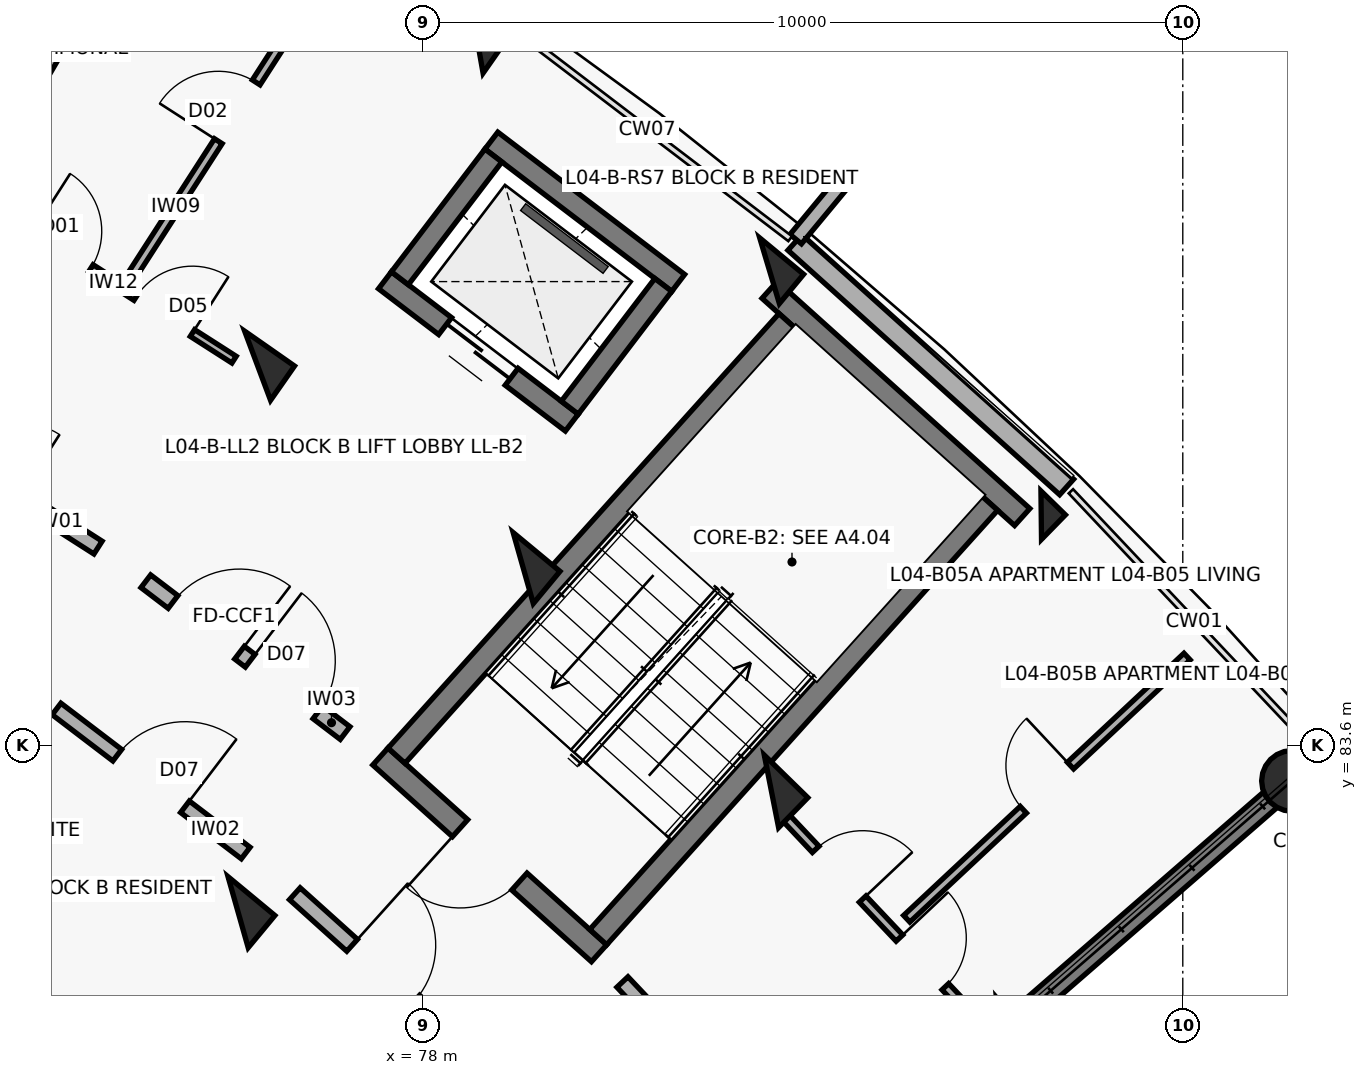
"""IFC4 building model, lengths in metres.
Left out: names, types, materials, properties, quantities, classifications, styles, units other than length and angle.
Written with IfcOpenShell. Run it as: python <this file> out.ifc"""

import sys

from ifc_helpers import new_model, si_unit, direction, frame, frame_2d, origin, origin_2d, place, context, subcontext, project, spatial, rectangle, circle, extrude, element, fill, save


model = new_model("IFC4")
c1 = context("Model", 3, precision=1e-05, world=origin(), true_north=direction((0.0, 1.0)))
c2 = subcontext(c1, "Body", "Model", "MODEL_VIEW")
j1 = project(units=[si_unit("LENGTHUNIT", "METRE"), si_unit("PLANEANGLEUNIT", "RADIAN")], contexts=[c1])
p1 = place(None, origin())
s1 = spatial("IfcSite", under=j1, at=p1, CompositionType="ELEMENT")
p2 = place(p1, origin())
s2 = spatial("IfcBuilding", under=s1, at=p2, CompositionType="ELEMENT")
p3 = place(p2, frame((0.0, 0.0, 14.3)))
s3 = spatial("IfcBuildingStorey", under=s2, at=p3, CompositionType="ELEMENT", Elevation=14.3)
p4 = place(p3, frame((75.828, 88.592, 0.0), z_axis=(0.0, 0.0, 1.0), x_axis=(0.573004420611, 0.819552276527, 0.0)))
e1 = element("IfcColumn", 1, at=p4, inside=s3, PredefinedType="COLUMN", context=c2, shape_type="SweptSolid", body=[
    extrude(rectangle(XDim=0.55, YDim=0.8, at=origin_2d()), origin(), (0.0, 0.0, 1.0), 3.1),
])
p5 = place(p3, frame((78.739, 92.755, 0.0), z_axis=(0.0, 0.0, 1.0), x_axis=(0.573004420611, 0.819552276527, 0.0)))
e2 = element("IfcColumn", 2, at=p5, inside=s3, PredefinedType="COLUMN", context=c2, shape_type="SweptSolid", body=[
    extrude(rectangle(XDim=0.45, YDim=0.45, at=origin_2d()), origin(), (0.0, 0.0, 1.0), 3.1),
])
for number, where, z_axis, x_axis in (
    (3, (75.571, 81.402, 0.0), (0.0, 0.0, 1.0), (0.638, 0.77, 0.0)),
    (4, (79.322, 85.93, 0.0), (0.0, 0.0, 1.0), (0.638, 0.77, 0.0)),
):
    element("IfcColumn", number, at=place(p3, frame(where, z_axis=z_axis, x_axis=x_axis)), inside=s3, PredefinedType="COLUMN", context=c2, shape_type="SweptSolid", body=[
        extrude(rectangle(XDim=0.55, YDim=0.8, at=origin_2d()), origin(), (0.0, 0.0, 1.0), 3.1),
    ])
p6 = place(p3, frame((82.563, 89.842, 0.0), z_axis=(0.0, 0.0, 1.0), x_axis=(0.637961754089, 0.770068049148, 0.0)))
e5 = element("IfcColumn", 5, at=p6, inside=s3, PredefinedType="COLUMN", context=c2, shape_type="SweptSolid", body=[
    extrude(rectangle(XDim=0.5, YDim=0.75, at=origin_2d()), origin(), (0.0, 0.0, 1.0), 3.1),
])
p7 = place(p3, frame((82.588, 82.991, 0.0), z_axis=(0.0, 0.0, 1.0), x_axis=(0.698665066769, 0.715448897181, 0.0)))
e6 = element("IfcColumn", 6, at=p7, inside=s3, PredefinedType="COLUMN", context=c2, shape_type="SweptSolid", body=[
    extrude(rectangle(XDim=0.55, YDim=0.8, at=origin_2d()), origin(), (0.0, 0.0, 1.0), 3.1),
])
p8 = place(p3, frame((86.137, 86.626, 0.0), z_axis=(0.0, 0.0, 1.0), x_axis=(0.698665066769, 0.715448897181, 0.0)))
e7 = element("IfcColumn", 7, at=p8, inside=s3, PredefinedType="COLUMN", context=c2, shape_type="SweptSolid", body=[
    extrude(rectangle(XDim=0.45, YDim=0.45, at=origin_2d()), origin(), (0.0, 0.0, 1.0), 3.1),
])
p9 = place(p3, frame((89.437, 83.129, 0.0), z_axis=(0.0, 0.0, 1.0), x_axis=(0.754709580223, 0.656059028991, 0.0)))
e8 = element("IfcColumn", 8, at=p9, inside=s3, PredefinedType="COLUMN", context=c2, shape_type="SweptSolid", body=[
    extrude(circle(Radius=0.4, at=origin_2d()), origin(), (0.0, 0.0, 1.0), 3.1),
])
p10 = place(p3, frame((85.739, 79.914, 0.0), z_axis=(0.0, 0.0, 1.0), x_axis=(0.754703505217, 0.65606601742, 0.0)))
e9 = element("IfcWall", 9, at=p10, inside=s3, PredefinedType="SHEAR", context=c2, shape_type="SweptSolid", body=[
    extrude(rectangle(XDim=4.72, YDim=0.27, at=frame_2d((2.36, 0.0))), origin(), (0.0, 0.0, 1.0), 2.86),
])
p11 = place(p3, frame((82.897, 90.213, 0.0), z_axis=(0.0, 0.0, 1.0), x_axis=(0.743387539862, -0.668860946369, 0.0)))
e10 = element("IfcWall", 10, at=p11, inside=s3, PredefinedType="SOLIDWALL", context=c2, shape_type="SweptSolid", body=[
    extrude(rectangle(XDim=4.809, YDim=0.275, at=frame_2d((2.405, 0.0))), origin(), (0.0, 0.0, 1.0), 2.25),
])
p12 = place(p3, frame((82.908, 90.257, 0.0), z_axis=(0.0, 0.0, 1.0), x_axis=(0.637967316825, 0.770063440674, 0.0)))
e11 = element("IfcWall", 11, at=p12, inside=s3, PredefinedType="PARAPET", context=c2, shape_type="SweptSolid", body=[
    extrude(rectangle(XDim=0.9, YDim=0.195, at=frame_2d((0.45, 0.0))), origin(), (0.0, 0.0, 1.0), 2.25),
])
p13 = place(p3, frame((80.32, 80.862, 0.0), z_axis=(0.0, 0.0, 1.0), x_axis=(-0.743375696158, 0.668874109501, 0.0)))
e12 = element("IfcWall", 12, at=p13, inside=s3, PredefinedType="SHEAR", context=c2, shape_type="SweptSolid", body=[
    extrude(rectangle(XDim=3.87, YDim=0.3, at=frame_2d((1.935, 0.0))), origin(), (0.0, 0.0, 1.0), 3.1),
])
p14 = place(p13, frame((1.41, 0.0, 0.0)))
e13 = element("IfcOpeningElement", 13, at=p14, cuts=e12, PredefinedType="OPENING", context=c2, shape_type="SweptSolid", body=[
    extrude(rectangle(XDim=1.05, YDim=2.15, at=frame_2d((0.525, 1.075))), frame((0.0, 0.16, 0.0), z_axis=(0.0, -1.0, 0.0), x_axis=(1.0, 0.0, 0.0)), (0.0, 0.0, 1.0), 0.32),
])
p15 = place(p3, frame((85.887, 86.601, 0.0), z_axis=(0.0, 0.0, 1.0), x_axis=(-0.743400052815, 0.668847038922, 0.0)))
e14 = element("IfcWall", 14, at=p15, inside=s3, PredefinedType="SHEAR", context=c2, shape_type="SweptSolid", body=[
    extrude(rectangle(XDim=4.47, YDim=0.3, at=frame_2d((2.235, 0.0))), origin(), (0.0, 0.0, 1.0), 3.1),
])
p16 = place(p3, frame((80.309, 81.073, 0.0), z_axis=(0.0, 0.0, 1.0), x_axis=(0.668885797871, 0.743365179038, 0.0)))
e15 = element("IfcWall", 15, at=p16, inside=s3, PredefinedType="SHEAR", context=c2, shape_type="SweptSolid", body=[
    extrude(rectangle(XDim=7.69, YDim=0.3, at=frame_2d((3.845, 0.0))), origin(), (0.0, 0.0, 1.0), 3.1),
])
p17 = place(p3, frame((77.655, 83.461, 0.0), z_axis=(0.0, 0.0, 1.0), x_axis=(0.668868253964, 0.743380964808, 0.0)))
e16 = element("IfcWall", 16, at=p17, inside=s3, PredefinedType="SHEAR", context=c2, shape_type="SweptSolid", body=[
    extrude(rectangle(XDim=7.69, YDim=0.3, at=frame_2d((3.845, 0.0))), origin(), (0.0, 0.0, 1.0), 3.1),
])
p18 = place(p3, frame((79.961, 87.844, 0.0), z_axis=(0.0, 0.0, 1.0), x_axis=(-0.795464365424, 0.606000365793, 0.0)))
e17 = element("IfcWall", 17, at=p18, inside=s3, PredefinedType="SHEAR", context=c2, shape_type="SweptSolid", body=[
    extrude(rectangle(XDim=3.09, YDim=0.28, at=frame_2d((1.545, 0.0))), origin(), (0.0, 0.0, 1.0), 3.1),
])
p19 = place(p18, frame((0.995, 0.0, 0.0)))
e18 = element("IfcOpeningElement", 18, at=p19, cuts=e17, PredefinedType="OPENING", context=c2, shape_type="SweptSolid", body=[
    extrude(rectangle(XDim=1.1, YDim=2.15, at=frame_2d((0.55, 1.075))), frame((0.0, 0.15, 0.0), z_axis=(0.0, -1.0, 0.0), x_axis=(1.0, 0.0, 0.0)), (0.0, 0.0, 1.0), 0.3),
])
p20 = place(p3, frame((81.361, 89.681, 0.0), z_axis=(0.0, 0.0, 1.0), x_axis=(-0.795502452183, 0.605950368076, 0.0)))
e19 = element("IfcWall", 19, at=p20, inside=s3, PredefinedType="SHEAR", context=c2, shape_type="SweptSolid", body=[
    extrude(rectangle(XDim=3.09, YDim=0.28, at=frame_2d((1.545, 0.0))), origin(), (0.0, 0.0, 1.0), 3.1),
])
for number, where, z_axis, x_axis in (
    (20, (79.935, 88.04, 0.0), (0.0, 0.0, 1.0), (0.606, 0.795, 0.0)),
    (21, (77.699, 89.743, 0.0), (0.0, 0.0, 1.0), (0.606, 0.795, 0.0)),
):
    element("IfcWall", number, at=place(p3, frame(where, z_axis=z_axis, x_axis=x_axis)), inside=s3, PredefinedType="SHEAR", context=c2, shape_type="SweptSolid", body=[
        extrude(rectangle(XDim=2.03, YDim=0.28, at=frame_2d((1.015, 0.0))), origin(), (0.0, 0.0, 1.0), 3.1),
    ])
p21 = place(p3, frame((70.834, 88.051, 0.0), z_axis=(0.0, 0.0, 1.0), x_axis=(0.842257205985, -0.539075874963, 0.0)))
e22 = element("IfcWall", 22, at=p21, inside=s3, PredefinedType="SOLIDWALL", context=c2, shape_type="SweptSolid", body=[
    extrude(rectangle(XDim=3.436, YDim=0.2, at=frame_2d((1.718, 0.0))), origin(), (0.0, 0.0, 1.0), 2.08),
])
p22 = place(p21, frame((1.228, 0.0, 0.0)))
e23 = element("IfcOpeningElement", 23, at=p22, cuts=e22, PredefinedType="OPENING", context=c2, shape_type="SweptSolid", body=[
    extrude(rectangle(XDim=0.98, YDim=2.15, at=frame_2d((0.49, 1.075))), frame((0.0, 0.11, 0.0), z_axis=(0.0, -1.0, 0.0), x_axis=(1.0, 0.0, 0.0)), (0.0, 0.0, 1.0), 0.22),
])
p23 = place(p3, frame((72.33, 90.712, 0.0), z_axis=(0.0, 0.0, 1.0), x_axis=(0.842245628842, -0.539093962771, 0.0)))
e24 = element("IfcWall", 24, at=p23, inside=s3, PredefinedType="PARTITIONING", context=c2, shape_type="SweptSolid", body=[
    extrude(rectangle(XDim=3.785, YDim=0.105, at=frame_2d((1.893, 0.0))), origin(), (0.0, 0.0, 1.0), 2.08),
])
p24 = place(p23, frame((0.65, 0.0, 0.0)))
e25 = element("IfcOpeningElement", 25, at=p24, cuts=e24, PredefinedType="OPENING", context=c2, shape_type="SweptSolid", body=[
    extrude(rectangle(XDim=0.9, YDim=2.1, at=frame_2d((0.45, 1.05))), frame((0.0, 0.062, 0.0), z_axis=(0.0, -1.0, 0.0), x_axis=(1.0, 0.0, 0.0)), (0.0, 0.0, 1.0), 0.125),
])
p25 = place(p23, frame((2.255, 0.0, 0.0)))
e26 = element("IfcOpeningElement", 26, at=p25, cuts=e24, PredefinedType="OPENING", context=c2, shape_type="SweptSolid", body=[
    extrude(rectangle(XDim=0.88, YDim=2.1, at=frame_2d((0.44, 1.05))), frame((0.0, 0.062, 0.0), z_axis=(0.0, -1.0, 0.0), x_axis=(1.0, 0.0, 0.0)), (0.0, 0.0, 1.0), 0.125),
])
p26 = place(p3, frame((74.192, 89.81, 0.0), z_axis=(0.0, 0.0, 1.0), x_axis=(0.541612517702, 0.840628265447, 0.0)))
e27 = element("IfcWall", 27, at=p26, inside=s3, PredefinedType="PARTITIONING", context=c2, shape_type="SweptSolid", body=[
    extrude(rectangle(XDim=5.05, YDim=0.12, at=frame_2d((2.525, 0.0))), origin(), (0.0, 0.0, 1.0), 2.08),
])
p27 = place(p26, frame((2.065, 0.0, 0.0)))
e28 = element("IfcOpeningElement", 28, at=p27, cuts=e27, PredefinedType="OPENING", context=c2, shape_type="SweptSolid", body=[
    extrude(rectangle(XDim=0.92, YDim=2.1, at=frame_2d((0.46, 1.05))), frame((0.0, 0.07, 0.0), z_axis=(0.0, -1.0, 0.0), x_axis=(1.0, 0.0, 0.0)), (0.0, 0.0, 1.0), 0.14),
])
p28 = place(p3, frame((72.379, 91.392, 0.0), z_axis=(0.0, 0.0, 1.0), x_axis=(0.504216452091, 0.863577309475, 0.0)))
e29 = element("IfcWall", 29, at=p28, inside=s3, PredefinedType="SOLIDWALL", context=c2, shape_type="SweptSolid", body=[
    extrude(rectangle(XDim=4.35, YDim=0.185, at=frame_2d((2.175, 0.0))), origin(), (0.0, 0.0, 1.0), 2.08),
])
p29 = place(p3, frame((74.357, 85.756, 0.0), z_axis=(0.0, 0.0, 1.0), x_axis=(0.795498026433, -0.605956178235, 0.0)))
e30 = element("IfcWall", 30, at=p29, inside=s3, PredefinedType="SOLIDWALL", context=c2, shape_type="SweptSolid", body=[
    extrude(rectangle(XDim=3.296, YDim=0.21, at=frame_2d((1.648, 0.0))), origin(), (0.0, 0.0, 1.0), 2.08),
])
p30 = place(p29, frame((0.45, 0.0, 0.0)))
e31 = element("IfcOpeningElement", 31, at=p30, cuts=e30, PredefinedType="OPENING", context=c2, shape_type="SweptSolid", body=[
    extrude(rectangle(XDim=1.1, YDim=2.15, at=frame_2d((0.55, 1.075))), frame((0.0, 0.115, 0.0), z_axis=(0.0, -1.0, 0.0), x_axis=(1.0, 0.0, 0.0)), (0.0, 0.0, 1.0), 0.23),
])
p31 = place(p29, frame((1.726, 0.0, 0.0)))
e32 = element("IfcOpeningElement", 32, at=p31, cuts=e30, PredefinedType="OPENING", context=c2, shape_type="SweptSolid", body=[
    extrude(rectangle(XDim=1.12, YDim=2.15, at=frame_2d((0.56, 1.075))), frame((0.0, 0.115, 0.0), z_axis=(0.0, -1.0, 0.0), x_axis=(1.0, 0.0, 0.0)), (0.0, 0.0, 1.0), 0.23),
])
p32 = place(p3, frame((73.182, 84.076, 0.0), z_axis=(0.0, 0.0, 1.0), x_axis=(0.795501577908, -0.605951515838, 0.0)))
e33 = element("IfcWall", 33, at=p32, inside=s3, PredefinedType="SOLIDWALL", context=c2, shape_type="SweptSolid", body=[
    extrude(rectangle(XDim=3.129, YDim=0.19, at=frame_2d((1.564, 0.0))), origin(), (0.0, 0.0, 1.0), 2.08),
])
p33 = place(p32, frame((1.004, 0.0, 0.0)))
e34 = element("IfcOpeningElement", 34, at=p33, cuts=e33, PredefinedType="OPENING", context=c2, shape_type="SweptSolid", body=[
    extrude(rectangle(XDim=1.12, YDim=2.15, at=frame_2d((0.56, 1.075))), frame((0.0, 0.105, 0.0), z_axis=(0.0, -1.0, 0.0), x_axis=(1.0, 0.0, 0.0)), (0.0, 0.0, 1.0), 0.21),
])
p34 = place(p3, frame((76.317, 81.644, 0.0), z_axis=(0.0, 0.0, 1.0), x_axis=(0.743387266925, -0.668861249718, 0.0)))
e35 = element("IfcWall", 35, at=p34, inside=s3, PredefinedType="SOLIDWALL", context=c2, shape_type="SweptSolid", body=[
    extrude(rectangle(XDim=3.128, YDim=0.21, at=frame_2d((1.564, 0.0))), origin(), (0.0, 0.0, 1.0), 2.08),
])
p35 = place(p34, frame((1.014, 0.0, 0.0)))
e36 = element("IfcOpeningElement", 36, at=p35, cuts=e35, PredefinedType="OPENING", context=c2, shape_type="SweptSolid", body=[
    extrude(rectangle(XDim=1.1, YDim=2.15, at=frame_2d((0.55, 1.075))), frame((0.0, 0.115, 0.0), z_axis=(0.0, -1.0, 0.0), x_axis=(1.0, 0.0, 0.0)), (0.0, 0.0, 1.0), 0.23),
])
p36 = place(p3, frame((80.628, 80.483, 0.0), z_axis=(0.0, 0.0, 1.0), x_axis=(0.686310507227, -0.727308660522, 0.0)))
e37 = element("IfcWall", 37, at=p36, inside=s3, PredefinedType="SOLIDWALL", context=c2, shape_type="SweptSolid", body=[
    extrude(rectangle(XDim=3.436, YDim=0.2, at=frame_2d((1.718, 0.0))), origin(), (0.0, 0.0, 1.0), 2.08),
])
p37 = place(p36, frame((1.208, 0.0, 0.0)))
e38 = element("IfcOpeningElement", 38, at=p37, cuts=e37, PredefinedType="OPENING", context=c2, shape_type="SweptSolid", body=[
    extrude(rectangle(XDim=1.02, YDim=2.15, at=frame_2d((0.51, 1.075))), frame((0.0, 0.11, 0.0), z_axis=(0.0, -1.0, 0.0), x_axis=(1.0, 0.0, 0.0)), (0.0, 0.0, 1.0), 0.22),
])
p38 = place(p3, frame((82.724, 82.701, 0.0), z_axis=(0.0, 0.0, 1.0), x_axis=(0.686331812627, -0.72728855551, 0.0)))
e39 = element("IfcWall", 39, at=p38, inside=s3, PredefinedType="PARTITIONING", context=c2, shape_type="SweptSolid", body=[
    extrude(rectangle(XDim=3.785, YDim=0.12, at=frame_2d((1.893, 0.0))), origin(), (0.0, 0.0, 1.0), 2.08),
])
p39 = place(p38, frame((0.65, 0.0, 0.0)))
e40 = element("IfcOpeningElement", 40, at=p39, cuts=e39, PredefinedType="OPENING", context=c2, shape_type="SweptSolid", body=[
    extrude(rectangle(XDim=0.9, YDim=2.1, at=frame_2d((0.45, 1.05))), frame((0.0, 0.07, 0.0), z_axis=(0.0, -1.0, 0.0), x_axis=(1.0, 0.0, 0.0)), (0.0, 0.0, 1.0), 0.14),
])
p40 = place(p38, frame((2.255, 0.0, 0.0)))
e41 = element("IfcOpeningElement", 41, at=p40, cuts=e39, PredefinedType="OPENING", context=c2, shape_type="SweptSolid", body=[
    extrude(rectangle(XDim=0.88, YDim=2.1, at=frame_2d((0.44, 1.05))), frame((0.0, 0.07, 0.0), z_axis=(0.0, -1.0, 0.0), x_axis=(1.0, 0.0, 0.0)), (0.0, 0.0, 1.0), 0.14),
])
p41 = place(p3, frame((84.368, 81.315, 0.0), z_axis=(0.0, 0.0, 1.0), x_axis=(0.73037487973, 0.683046510173, 0.0)))
e42 = element("IfcWall", 42, at=p41, inside=s3, PredefinedType="PARTITIONING", context=c2, shape_type="SweptSolid", body=[
    extrude(rectangle(XDim=5.05, YDim=0.12, at=frame_2d((2.525, 0.0))), origin(), (0.0, 0.0, 1.0), 2.08),
])
p42 = place(p41, frame((2.1, 0.0, 0.0)))
e43 = element("IfcOpeningElement", 43, at=p42, cuts=e42, PredefinedType="OPENING", context=c2, shape_type="SweptSolid", body=[
    extrude(rectangle(XDim=0.85, YDim=2.1, at=frame_2d((0.425, 1.05))), frame((0.0, 0.07, 0.0), z_axis=(0.0, -1.0, 0.0), x_axis=(1.0, 0.0, 0.0)), (0.0, 0.0, 1.0), 0.14),
])
p43 = place(p14, origin())
e44 = element("IfcDoor", 44, at=p43, inside=s3, OperationType="SINGLE_SWING_RIGHT", PredefinedType="DOOR", context=c2, shape_type="SweptSolid", body=[
    extrude(rectangle(XDim=1.05, YDim=2.15, at=frame_2d((0.525, 1.075))), frame((0.0, 0.025, 0.0), z_axis=(0.0, -1.0, 0.0), x_axis=(1.0, 0.0, 0.0)), (0.0, 0.0, 1.0), 0.05),
])
fill(e13, e44)
p44 = place(p19, origin())
e45 = element("IfcDoor", 45, at=p44, inside=s3, OperationType="DOUBLE_DOOR_SLIDING", PredefinedType="DOOR", context=c2, shape_type="SweptSolid", body=[
    extrude(rectangle(XDim=1.1, YDim=2.15, at=frame_2d((0.55, 1.075))), frame((0.0, 0.025, 0.0), z_axis=(0.0, -1.0, 0.0), x_axis=(1.0, 0.0, 0.0)), (0.0, 0.0, 1.0), 0.05),
])
fill(e18, e45)
p45 = place(p24, origin())
e46 = element("IfcDoor", 46, at=p45, inside=s3, OperationType="SINGLE_SWING_LEFT", PredefinedType="DOOR", context=c2, shape_type="SweptSolid", body=[
    extrude(rectangle(XDim=0.9, YDim=2.1, at=frame_2d((0.45, 1.05))), frame((0.0, 0.025, 0.0), z_axis=(0.0, -1.0, 0.0), x_axis=(1.0, 0.0, 0.0)), (0.0, 0.0, 1.0), 0.05),
])
fill(e25, e46)
p46 = place(p25, origin())
e47 = element("IfcDoor", 47, at=p46, inside=s3, OperationType="SINGLE_SWING_RIGHT", PredefinedType="DOOR", context=c2, shape_type="SweptSolid", body=[
    extrude(rectangle(XDim=0.88, YDim=2.1, at=frame_2d((0.44, 1.05))), frame((0.0, 0.025, 0.0), z_axis=(0.0, -1.0, 0.0), x_axis=(1.0, 0.0, 0.0)), (0.0, 0.0, 1.0), 0.05),
])
fill(e26, e47)
p47 = place(p27, origin())
e48 = element("IfcDoor", 48, at=p47, inside=s3, OperationType="SINGLE_SWING_LEFT", PredefinedType="DOOR", context=c2, shape_type="SweptSolid", body=[
    extrude(rectangle(XDim=0.92, YDim=2.1, at=frame_2d((0.46, 1.05))), frame((0.0, 0.025, 0.0), z_axis=(0.0, -1.0, 0.0), x_axis=(1.0, 0.0, 0.0)), (0.0, 0.0, 1.0), 0.05),
])
fill(e28, e48)
p48 = place(p30, origin())
e49 = element("IfcDoor", 49, at=p48, inside=s3, OperationType="SINGLE_SWING_RIGHT", PredefinedType="DOOR", context=c2, shape_type="SweptSolid", body=[
    extrude(rectangle(XDim=1.1, YDim=2.15, at=frame_2d((0.55, 1.075))), frame((0.0, 0.025, 0.0), z_axis=(0.0, -1.0, 0.0), x_axis=(1.0, 0.0, 0.0)), (0.0, 0.0, 1.0), 0.05),
])
fill(e31, e49)
p49 = place(p31, origin())
e50 = element("IfcDoor", 50, at=p49, inside=s3, OperationType="SINGLE_SWING_LEFT", PredefinedType="DOOR", context=c2, shape_type="SweptSolid", body=[
    extrude(rectangle(XDim=1.12, YDim=2.15, at=frame_2d((0.56, 1.075))), frame((0.0, 0.025, 0.0), z_axis=(0.0, -1.0, 0.0), x_axis=(1.0, 0.0, 0.0)), (0.0, 0.0, 1.0), 0.05),
])
fill(e32, e50)
p50 = place(p33, origin())
e51 = element("IfcDoor", 51, at=p50, inside=s3, OperationType="SINGLE_SWING_RIGHT", PredefinedType="DOOR", context=c2, shape_type="SweptSolid", body=[
    extrude(rectangle(XDim=1.12, YDim=2.15, at=frame_2d((0.56, 1.075))), frame((0.0, 0.025, 0.0), z_axis=(0.0, -1.0, 0.0), x_axis=(1.0, 0.0, 0.0)), (0.0, 0.0, 1.0), 0.05),
])
fill(e34, e51)
p51 = place(p35, origin())
e52 = element("IfcDoor", 52, at=p51, inside=s3, OperationType="SINGLE_SWING_LEFT", PredefinedType="DOOR", context=c2, shape_type="SweptSolid", body=[
    extrude(rectangle(XDim=1.1, YDim=2.15, at=frame_2d((0.55, 1.075))), frame((0.0, 0.025, 0.0), z_axis=(0.0, -1.0, 0.0), x_axis=(1.0, 0.0, 0.0)), (0.0, 0.0, 1.0), 0.05),
])
fill(e36, e52)
p52 = place(p39, origin())
e53 = element("IfcDoor", 53, at=p52, inside=s3, OperationType="SINGLE_SWING_RIGHT", PredefinedType="DOOR", context=c2, shape_type="SweptSolid", body=[
    extrude(rectangle(XDim=0.9, YDim=2.1, at=frame_2d((0.45, 1.05))), frame((0.0, 0.025, 0.0), z_axis=(0.0, -1.0, 0.0), x_axis=(1.0, 0.0, 0.0)), (0.0, 0.0, 1.0), 0.05),
])
fill(e40, e53)
p53 = place(p40, origin())
e54 = element("IfcDoor", 54, at=p53, inside=s3, OperationType="SINGLE_SWING_LEFT", PredefinedType="DOOR", context=c2, shape_type="SweptSolid", body=[
    extrude(rectangle(XDim=0.88, YDim=2.1, at=frame_2d((0.44, 1.05))), frame((0.0, 0.025, 0.0), z_axis=(0.0, -1.0, 0.0), x_axis=(1.0, 0.0, 0.0)), (0.0, 0.0, 1.0), 0.05),
])
fill(e41, e54)
p54 = place(p42, origin())
e55 = element("IfcDoor", 55, at=p54, inside=s3, OperationType="SINGLE_SWING_RIGHT", PredefinedType="DOOR", context=c2, shape_type="SweptSolid", body=[
    extrude(rectangle(XDim=0.85, YDim=2.1, at=frame_2d((0.425, 1.05))), frame((0.0, 0.025, 0.0), z_axis=(0.0, -1.0, 0.0), x_axis=(1.0, 0.0, 0.0)), (0.0, 0.0, 1.0), 0.05),
])
fill(e43, e55)
save(model, sys.argv[1])
